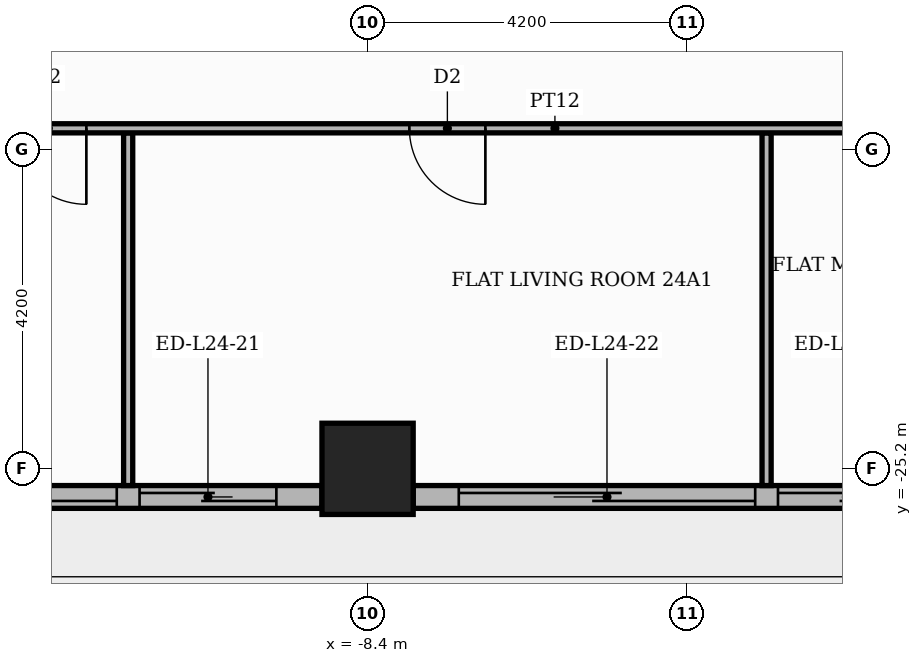
"""IFC4 building model, lengths in metres.
Left out: names, types, materials, properties, quantities, classifications, styles, units other than length and angle.
Written with IfcOpenShell. Run it as: python <this file> out.ifc"""

import sys

from ifc_helpers import new_model, si_unit, direction, frame, frame_2d, origin, origin_2d, place, context, subcontext, project, spatial, rectangle, extrude, element, fill, save


model = new_model("IFC4")
c1 = context("Model", 3, precision=1e-05, world=origin(), true_north=direction((0.0, 1.0)))
c2 = subcontext(c1, "Body", "Model", "MODEL_VIEW")
j1 = project(units=[si_unit("LENGTHUNIT", "METRE"), si_unit("PLANEANGLEUNIT", "RADIAN")], contexts=[c1])
p1 = place(None, origin())
s1 = spatial("IfcSite", under=j1, at=p1, CompositionType="ELEMENT")
p2 = place(p1, origin())
s2 = spatial("IfcBuilding", under=s1, at=p2, CompositionType="ELEMENT")
p3 = place(p2, frame((0.0, 0.0, 102.6)))
s3 = spatial("IfcBuildingStorey", under=s2, at=p3, CompositionType="ELEMENT", Elevation=102.6)
p4 = place(p3, frame((-8.4, -25.2, 0.0), z_axis=(0.0, 0.0, 1.0), x_axis=(1.0, 0.0, 0.0)))
e1 = element("IfcColumn", 1, at=p4, inside=s3, PredefinedType="COLUMN", context=c2, shape_type="SweptSolid", body=[
    extrude(rectangle(XDim=1.2, YDim=1.2, at=origin_2d()), origin(), (0.0, 0.0, 1.0), 3.9),
])
p5 = place(p3, frame((-16.2, -25.57, 0.0), z_axis=(0.0, 0.0, 1.0), x_axis=(1.0, 0.0, 0.0)))
e2 = element("IfcWall", 2, at=p5, inside=s3, PredefinedType="STANDARD", context=c2, shape_type="SweptSolid", body=[
    extrude(rectangle(XDim=7.2, YDim=0.3, at=frame_2d((3.6, 0.0))), origin(), (0.0, 0.0, 1.0), 3.48),
])
p6 = place(p5, frame((0.6, 0.0, 0.0)))
e3 = element("IfcOpeningElement", 3, at=p6, cuts=e2, PredefinedType="OPENING", context=c2, shape_type="SweptSolid", body=[
    extrude(rectangle(XDim=3.9, YDim=2.4, at=frame_2d((1.95, 1.2))), frame((0.0, 0.16, 0.0), z_axis=(0.0, -1.0, 0.0), x_axis=(1.0, 0.0, 0.0)), (0.0, 0.0, 1.0), 0.32),
])
p7 = place(p5, frame((4.8, 0.0, 0.0)))
e4 = element("IfcOpeningElement", 4, at=p7, cuts=e2, PredefinedType="OPENING", context=c2, shape_type="SweptSolid", body=[
    extrude(rectangle(XDim=1.8, YDim=2.4, at=frame_2d((0.9, 1.2))), frame((0.0, 0.16, 0.0), z_axis=(0.0, -1.0, 0.0), x_axis=(1.0, 0.0, 0.0)), (0.0, 0.0, 1.0), 0.32),
])
p8 = place(p3, frame((-7.8, -25.57, 0.0), z_axis=(0.0, 0.0, 1.0), x_axis=(1.0, 0.0, 0.0)))
e5 = element("IfcWall", 5, at=p8, inside=s3, PredefinedType="STANDARD", context=c2, shape_type="SweptSolid", body=[
    extrude(rectangle(XDim=7.2, YDim=0.3, at=frame_2d((3.6, 0.0))), origin(), (0.0, 0.0, 1.0), 3.48),
])
p9 = place(p8, frame((0.6, 0.0, 0.0)))
e6 = element("IfcOpeningElement", 6, at=p9, cuts=e5, PredefinedType="OPENING", context=c2, shape_type="SweptSolid", body=[
    extrude(rectangle(XDim=3.9, YDim=2.4, at=frame_2d((1.95, 1.2))), frame((0.0, 0.16, 0.0), z_axis=(0.0, -1.0, 0.0), x_axis=(1.0, 0.0, 0.0)), (0.0, 0.0, 1.0), 0.32),
])
p10 = place(p8, frame((4.8, 0.0, 0.0)))
e7 = element("IfcOpeningElement", 7, at=p10, cuts=e5, PredefinedType="OPENING", context=c2, shape_type="SweptSolid", body=[
    extrude(rectangle(XDim=1.8, YDim=2.4, at=frame_2d((0.9, 1.2))), frame((0.0, 0.16, 0.0), z_axis=(0.0, -1.0, 0.0), x_axis=(1.0, 0.0, 0.0)), (0.0, 0.0, 1.0), 0.32),
])
for number, where, z_axis, x_axis in (
    (8, (-11.55, -25.42, 0.0), (0.0, 0.0, 1.0), (0.0, 1.0, 0.0)),
    (9, (-3.15, -25.42, 0.0), (0.0, 0.0, 1.0), (0.0, 1.0, 0.0)),
):
    element("IfcWall", number, at=place(p3, frame(where, z_axis=z_axis, x_axis=x_axis)), inside=s3, PredefinedType="PARTITIONING", context=c2, shape_type="SweptSolid", body=[
        extrude(rectangle(XDim=4.64, YDim=0.12, at=frame_2d((2.32, 0.0))), origin(), (0.0, 0.0, 1.0), 3.48),
    ])
p11 = place(p3, frame((-25.42, -20.72, 0.0), z_axis=(0.0, 0.0, 1.0), x_axis=(1.0, 0.0, 0.0)))
e10 = element("IfcWall", 10, at=p11, inside=s3, PredefinedType="PARTITIONING", context=c2, shape_type="SweptSolid", body=[
    extrude(rectangle(XDim=38.97, YDim=0.12, at=frame_2d((19.485, 0.0))), origin(), (0.0, 0.0, 1.0), 3.48),
])
p12 = place(p11, frame((12.32, 0.0, 0.0)))
e11 = element("IfcOpeningElement", 11, at=p12, cuts=e10, PredefinedType="OPENING", context=c2, shape_type="SweptSolid", body=[
    extrude(rectangle(XDim=1.0, YDim=2.1, at=frame_2d((0.5, 1.05))), frame((0.0, 0.07, 0.0), z_axis=(0.0, -1.0, 0.0), x_axis=(1.0, 0.0, 0.0)), (0.0, 0.0, 1.0), 0.14),
])
p13 = place(p11, frame((17.57, 0.0, 0.0)))
e12 = element("IfcOpeningElement", 12, at=p13, cuts=e10, PredefinedType="OPENING", context=c2, shape_type="SweptSolid", body=[
    extrude(rectangle(XDim=1.0, YDim=2.1, at=frame_2d((0.5, 1.05))), frame((0.0, 0.07, 0.0), z_axis=(0.0, -1.0, 0.0), x_axis=(1.0, 0.0, 0.0)), (0.0, 0.0, 1.0), 0.14),
])
p14 = place(p11, frame((24.97, 0.0, 0.0)))
e13 = element("IfcOpeningElement", 13, at=p14, cuts=e10, PredefinedType="OPENING", context=c2, shape_type="SweptSolid", body=[
    extrude(rectangle(XDim=0.9, YDim=2.1, at=frame_2d((0.45, 1.05))), frame((0.0, 0.07, 0.0), z_axis=(0.0, -1.0, 0.0), x_axis=(1.0, 0.0, 0.0)), (0.0, 0.0, 1.0), 0.14),
])
p15 = place(p11, frame((34.42, 0.0, 0.0)))
e14 = element("IfcOpeningElement", 14, at=p15, cuts=e10, PredefinedType="OPENING", context=c2, shape_type="SweptSolid", body=[
    extrude(rectangle(XDim=0.9, YDim=2.1, at=frame_2d((0.45, 1.05))), frame((0.0, 0.07, 0.0), z_axis=(0.0, -1.0, 0.0), x_axis=(1.0, 0.0, 0.0)), (0.0, 0.0, 1.0), 0.14),
])
p16 = place(p6, origin())
e15 = element("IfcDoor", 15, at=p16, inside=s3, OperationType="SLIDING_TO_LEFT", PredefinedType="DOOR", context=c2, shape_type="SweptSolid", body=[
    extrude(rectangle(XDim=3.9, YDim=2.4, at=frame_2d((1.95, 1.2))), frame((0.0, 0.025, 0.0), z_axis=(0.0, -1.0, 0.0), x_axis=(1.0, 0.0, 0.0)), (0.0, 0.0, 1.0), 0.05),
])
fill(e3, e15)
p17 = place(p7, origin())
e16 = element("IfcDoor", 16, at=p17, inside=s3, OperationType="SLIDING_TO_RIGHT", PredefinedType="DOOR", context=c2, shape_type="SweptSolid", body=[
    extrude(rectangle(XDim=1.8, YDim=2.4, at=frame_2d((0.9, 1.2))), frame((0.0, 0.025, 0.0), z_axis=(0.0, -1.0, 0.0), x_axis=(1.0, 0.0, 0.0)), (0.0, 0.0, 1.0), 0.05),
])
fill(e4, e16)
p18 = place(p9, origin())
e17 = element("IfcDoor", 17, at=p18, inside=s3, OperationType="SLIDING_TO_LEFT", PredefinedType="DOOR", context=c2, shape_type="SweptSolid", body=[
    extrude(rectangle(XDim=3.9, YDim=2.4, at=frame_2d((1.95, 1.2))), frame((0.0, 0.025, 0.0), z_axis=(0.0, -1.0, 0.0), x_axis=(1.0, 0.0, 0.0)), (0.0, 0.0, 1.0), 0.05),
])
fill(e6, e17)
p19 = place(p10, origin())
e18 = element("IfcDoor", 18, at=p19, inside=s3, OperationType="SLIDING_TO_RIGHT", PredefinedType="DOOR", context=c2, shape_type="SweptSolid", body=[
    extrude(rectangle(XDim=1.8, YDim=2.4, at=frame_2d((0.9, 1.2))), frame((0.0, 0.025, 0.0), z_axis=(0.0, -1.0, 0.0), x_axis=(1.0, 0.0, 0.0)), (0.0, 0.0, 1.0), 0.05),
])
fill(e7, e18)
p20 = place(p12, frame((1.0, 0.0, 0.0), z_axis=(0.0, 0.0, 1.0), x_axis=(-1.0, 0.0, 0.0)))
e19 = element("IfcDoor", 19, at=p20, inside=s3, OperationType="SINGLE_SWING_RIGHT", PredefinedType="DOOR", context=c2, shape_type="SweptSolid", body=[
    extrude(rectangle(XDim=1.0, YDim=2.1, at=frame_2d((0.5, 1.05))), frame((0.0, 0.025, 0.0), z_axis=(0.0, -1.0, 0.0), x_axis=(1.0, 0.0, 0.0)), (0.0, 0.0, 1.0), 0.05),
])
fill(e11, e19)
p21 = place(p13, frame((1.0, 0.0, 0.0), z_axis=(0.0, 0.0, 1.0), x_axis=(-1.0, 0.0, 0.0)))
e20 = element("IfcDoor", 20, at=p21, inside=s3, OperationType="SINGLE_SWING_RIGHT", PredefinedType="DOOR", context=c2, shape_type="SweptSolid", body=[
    extrude(rectangle(XDim=1.0, YDim=2.1, at=frame_2d((0.5, 1.05))), frame((0.0, 0.025, 0.0), z_axis=(0.0, -1.0, 0.0), x_axis=(1.0, 0.0, 0.0)), (0.0, 0.0, 1.0), 0.05),
])
fill(e12, e20)
save(model, sys.argv[1])
